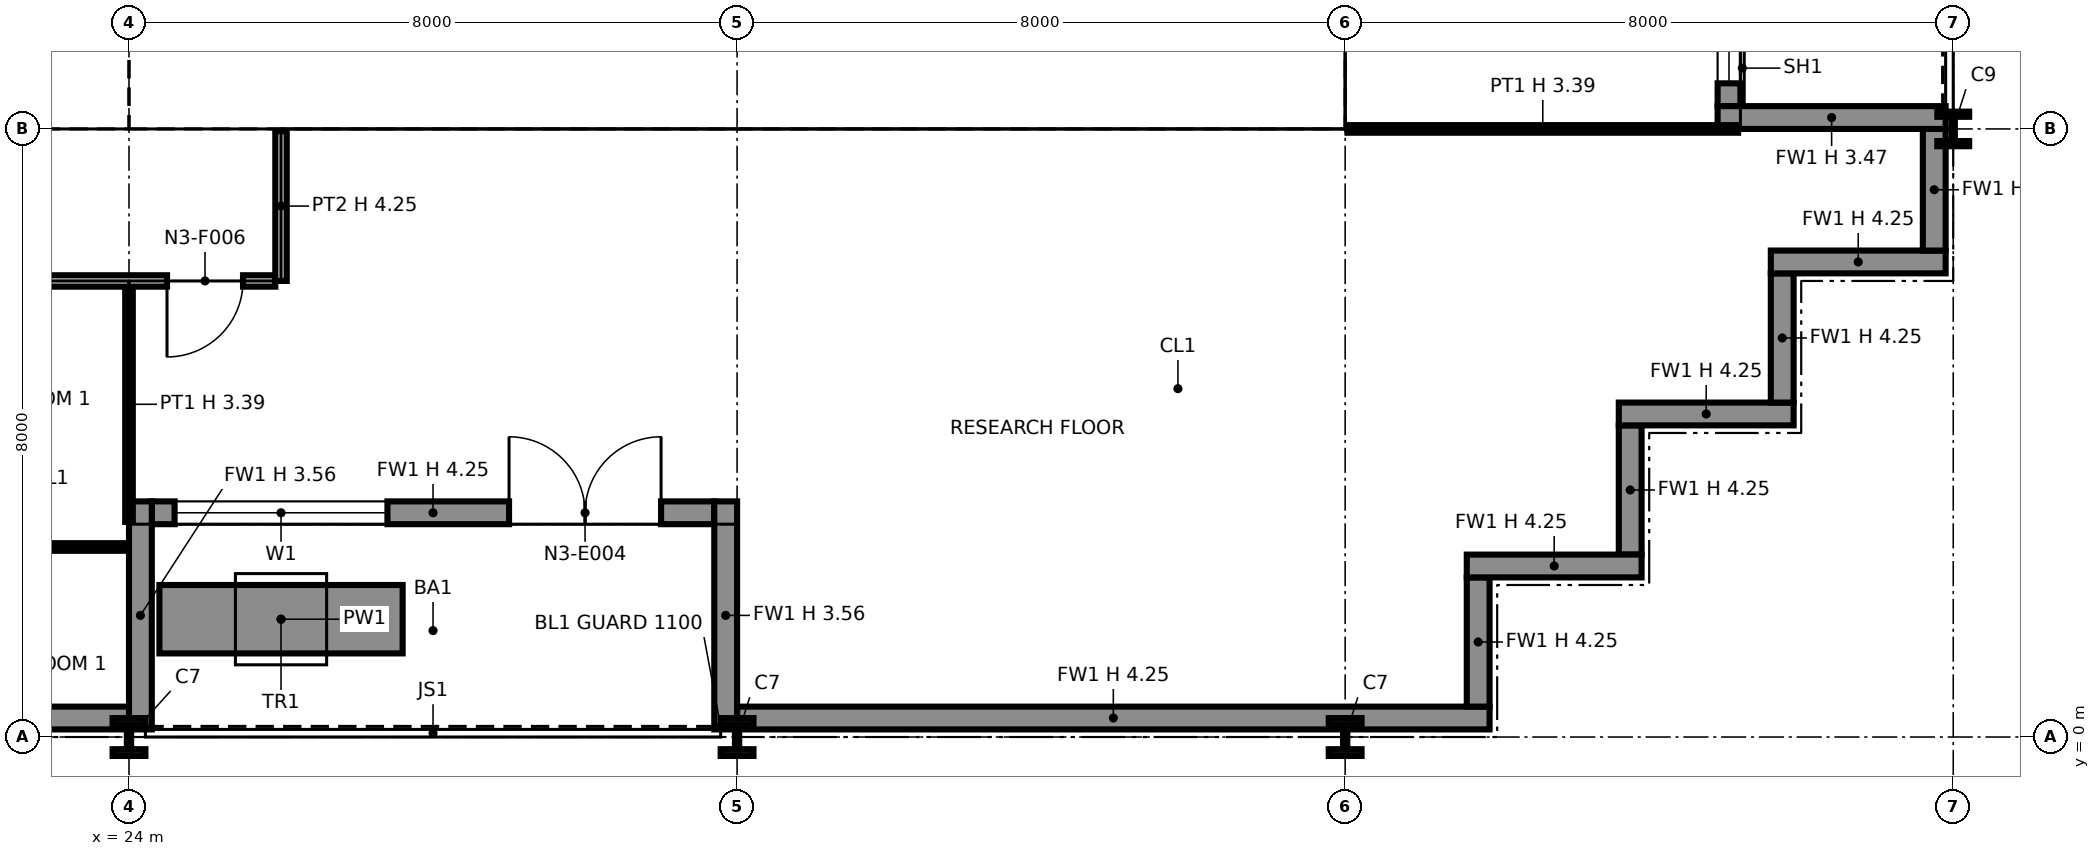
"""IFC4 building model, lengths in metres.
Left out: names, types, materials, properties, quantities, classifications, styles, units other than length and angle.
Written with IfcOpenShell. Run it as: python <this file> out.ifc"""

import sys

from ifc_helpers import new_model, si_unit, direction, frame, frame_2d, origin, origin_2d, place, context, subcontext, project, spatial, polyline, rectangle, i_section, outline, extrude, element, fill, save


model = new_model("IFC4")
c1 = context("Model", 3, precision=1e-05, world=origin(), true_north=direction((0.0, 1.0)))
c2 = subcontext(c1, "Body", "Model", "MODEL_VIEW")
j1 = project(units=[si_unit("LENGTHUNIT", "METRE"), si_unit("PLANEANGLEUNIT", "RADIAN")], contexts=[c1])
p1 = place(None, origin())
s1 = spatial("IfcSite", under=j1, at=p1, CompositionType="ELEMENT")
p2 = place(p1, origin())
s2 = spatial("IfcBuilding", under=s1, at=p2, CompositionType="ELEMENT")
p3 = place(p2, frame((0.0, 0.0, 61.2)))
s3 = spatial("IfcBuildingStorey", under=s2, at=p3, CompositionType="ELEMENT", Elevation=61.2)
p4 = place(p3, frame((24.0, 0.0, 0.0), z_axis=(0.0, 0.0, 1.0), x_axis=(1.0, 0.0, 0.0)))
e1 = element("IfcColumn", 1, at=p4, inside=s3, PredefinedType="COLUMN", context=c2, shape_type="SweptSolid", body=[
    extrude(i_section(OverallWidth=0.432, OverallDepth=0.498, WebThickness=0.056, FlangeThickness=0.089, at=origin_2d()), origin(), (0.0, 0.0, 1.0), 4.25),
])
p5 = place(p3, frame((24.0, 8.0, 0.0), z_axis=(0.0, 0.0, 1.0), x_axis=(1.0, 0.0, 0.0)))
e2 = element("IfcColumn", 2, at=p5, inside=s3, PredefinedType="COLUMN", context=c2, shape_type="SweptSolid", body=[
    extrude(i_section(OverallWidth=0.424, OverallDepth=0.475, WebThickness=0.048, FlangeThickness=0.077, at=origin_2d()), origin(), (0.0, 0.0, 1.0), 4.25),
])
p6 = place(p3, frame((32.0, 0.0, 0.0), z_axis=(0.0, 0.0, 1.0), x_axis=(1.0, 0.0, 0.0)))
e3 = element("IfcColumn", 3, at=p6, inside=s3, PredefinedType="COLUMN", context=c2, shape_type="SweptSolid", body=[
    extrude(i_section(OverallWidth=0.432, OverallDepth=0.498, WebThickness=0.056, FlangeThickness=0.089, at=origin_2d()), origin(), (0.0, 0.0, 1.0), 4.25),
])
p7 = place(p3, frame((32.0, 8.0, 0.0), z_axis=(0.0, 0.0, 1.0), x_axis=(1.0, 0.0, 0.0)))
e4 = element("IfcColumn", 4, at=p7, inside=s3, PredefinedType="COLUMN", context=c2, shape_type="SweptSolid", body=[
    extrude(i_section(OverallWidth=0.406, OverallDepth=0.417, WebThickness=0.03, FlangeThickness=0.048, at=origin_2d()), origin(), (0.0, 0.0, 1.0), 4.25),
])
p8 = place(p3, frame((40.0, 0.0, 0.0), z_axis=(0.0, 0.0, 1.0), x_axis=(1.0, 0.0, 0.0)))
e5 = element("IfcColumn", 5, at=p8, inside=s3, PredefinedType="COLUMN", context=c2, shape_type="SweptSolid", body=[
    extrude(i_section(OverallWidth=0.432, OverallDepth=0.498, WebThickness=0.056, FlangeThickness=0.089, at=origin_2d()), origin(), (0.0, 0.0, 1.0), 4.25),
])
p9 = place(p3, frame((40.0, 8.0, 0.0), z_axis=(0.0, 0.0, 1.0), x_axis=(1.0, 0.0, 0.0)))
e6 = element("IfcColumn", 6, at=p9, inside=s3, PredefinedType="COLUMN", context=c2, shape_type="SweptSolid", body=[
    extrude(i_section(OverallWidth=0.406, OverallDepth=0.417, WebThickness=0.03, FlangeThickness=0.048, at=origin_2d()), origin(), (0.0, 0.0, 1.0), 4.25),
])
p10 = place(p3, frame((48.0, 8.0, 0.0), z_axis=(0.0, 0.0, 1.0), x_axis=(1.0, 0.0, 0.0)))
e7 = element("IfcColumn", 7, at=p10, inside=s3, PredefinedType="COLUMN", context=c2, shape_type="SweptSolid", body=[
    extrude(i_section(OverallWidth=0.419, OverallDepth=0.455, WebThickness=0.042, FlangeThickness=0.068, at=origin_2d()), origin(), (0.0, 0.0, 1.0), 4.25),
])
p11 = place(p3, frame((16.0, 0.25, 0.0), z_axis=(0.0, 0.0, 1.0), x_axis=(1.0, 0.0, 0.0)))
e8 = element("IfcWall", 8, at=p11, inside=s3, PredefinedType="SOLIDWALL", context=c2, shape_type="SweptSolid", body=[
    extrude(rectangle(XDim=8.0, YDim=0.3, at=frame_2d((4.0, 0.0))), origin(), (0.0, 0.0, 1.0), 4.25),
])
p12 = place(p3, frame((24.3, 2.95, 0.0), z_axis=(0.0, 0.0, 1.0), x_axis=(1.0, 0.0, 0.0)))
e9 = element("IfcWall", 9, at=p12, inside=s3, PredefinedType="SOLIDWALL", context=c2, shape_type="SweptSolid", body=[
    extrude(rectangle(XDim=7.4, YDim=0.3, at=frame_2d((3.7, 0.0))), origin(), (0.0, 0.0, 1.0), 4.25),
])
p13 = place(p12, frame((0.3, 0.0, 0.9)))
e10 = element("IfcOpeningElement", 10, at=p13, cuts=e9, PredefinedType="OPENING", context=c2, shape_type="SweptSolid", body=[
    extrude(rectangle(XDim=2.8, YDim=2.2, at=frame_2d((1.4, 1.1))), frame((0.0, 0.16, 0.0), z_axis=(0.0, -1.0, 0.0), x_axis=(1.0, 0.0, 0.0)), (0.0, 0.0, 1.0), 0.32),
])
p14 = place(p12, frame((4.7, 0.0, 0.0)))
e11 = element("IfcOpeningElement", 11, at=p14, cuts=e9, PredefinedType="OPENING", context=c2, shape_type="SweptSolid", body=[
    extrude(rectangle(XDim=2.0, YDim=2.4, at=frame_2d((1.0, 1.2))), frame((0.0, 0.16, 0.0), z_axis=(0.0, -1.0, 0.0), x_axis=(1.0, 0.0, 0.0)), (0.0, 0.0, 1.0), 0.32),
])
for number, where, z_axis, x_axis in (
    (12, (24.15, 0.1, 0.0), (0.0, 0.0, 1.0), (0.0, 1.0, 0.0)),
    (13, (31.85, 0.1, 0.0), (0.0, 0.0, 1.0), (0.0, 1.0, 0.0)),
):
    element("IfcWall", number, at=place(p3, frame(where, z_axis=z_axis, x_axis=x_axis)), inside=s3, PredefinedType="SOLIDWALL", context=c2, shape_type="SweptSolid", body=[
        extrude(rectangle(XDim=3.0, YDim=0.3, at=frame_2d((1.5, 0.0))), origin(), (0.0, 0.0, 1.0), 3.556),
    ])
p15 = place(p3, frame((32.0, 0.25, 0.0), z_axis=(0.0, 0.0, 1.0), x_axis=(1.0, 0.0, 0.0)))
e14 = element("IfcWall", 14, at=p15, inside=s3, PredefinedType="SOLIDWALL", context=c2, shape_type="SweptSolid", body=[
    extrude(rectangle(XDim=9.9, YDim=0.3, at=frame_2d((4.95, 0.0))), origin(), (0.0, 0.0, 1.0), 4.25),
])
p16 = place(p3, frame((24.4, 1.55, 0.0), z_axis=(0.0, 0.0, 1.0), x_axis=(1.0, 0.0, 0.0)))
e15 = element("IfcWall", 15, at=p16, inside=s3, PredefinedType="SOLIDWALL", context=c2, shape_type="SweptSolid", body=[
    extrude(rectangle(XDim=3.2, YDim=0.9, at=frame_2d((1.6, 0.0))), origin(), (0.0, 0.0, 1.0), 0.6),
])
p17 = place(p3, frame((41.75, 0.4, 0.0), z_axis=(0.0, 0.0, 1.0), x_axis=(0.0, 1.0, 0.0)))
e16 = element("IfcWall", 16, at=p17, inside=s3, PredefinedType="SOLIDWALL", context=c2, shape_type="SweptSolid", body=[
    extrude(rectangle(XDim=1.7, YDim=0.3, at=frame_2d((0.85, 0.0))), origin(), (0.0, 0.0, 1.0), 4.25),
])
p18 = place(p3, frame((41.6, 2.25, 0.0), z_axis=(0.0, 0.0, 1.0), x_axis=(1.0, 0.0, 0.0)))
e17 = element("IfcWall", 17, at=p18, inside=s3, PredefinedType="SOLIDWALL", context=c2, shape_type="SweptSolid", body=[
    extrude(rectangle(XDim=2.3, YDim=0.3, at=frame_2d((1.15, 0.0))), origin(), (0.0, 0.0, 1.0), 4.25),
])
p19 = place(p3, frame((43.75, 2.4, 0.0), z_axis=(0.0, 0.0, 1.0), x_axis=(0.0, 1.0, 0.0)))
e18 = element("IfcWall", 18, at=p19, inside=s3, PredefinedType="SOLIDWALL", context=c2, shape_type="SweptSolid", body=[
    extrude(rectangle(XDim=1.7, YDim=0.3, at=frame_2d((0.85, 0.0))), origin(), (0.0, 0.0, 1.0), 4.25),
])
p20 = place(p3, frame((43.6, 4.25, 0.0), z_axis=(0.0, 0.0, 1.0), x_axis=(1.0, 0.0, 0.0)))
e19 = element("IfcWall", 19, at=p20, inside=s3, PredefinedType="SOLIDWALL", context=c2, shape_type="SweptSolid", body=[
    extrude(rectangle(XDim=2.3, YDim=0.3, at=frame_2d((1.15, 0.0))), origin(), (0.0, 0.0, 1.0), 4.25),
])
p21 = place(p3, frame((45.75, 4.4, 0.0), z_axis=(0.0, 0.0, 1.0), x_axis=(0.0, 1.0, 0.0)))
e20 = element("IfcWall", 20, at=p21, inside=s3, PredefinedType="SOLIDWALL", context=c2, shape_type="SweptSolid", body=[
    extrude(rectangle(XDim=1.7, YDim=0.3, at=frame_2d((0.85, 0.0))), origin(), (0.0, 0.0, 1.0), 4.25),
])
p22 = place(p3, frame((45.6, 6.25, 0.0), z_axis=(0.0, 0.0, 1.0), x_axis=(1.0, 0.0, 0.0)))
e21 = element("IfcWall", 21, at=p22, inside=s3, PredefinedType="SOLIDWALL", context=c2, shape_type="SweptSolid", body=[
    extrude(rectangle(XDim=2.3, YDim=0.3, at=frame_2d((1.15, 0.0))), origin(), (0.0, 0.0, 1.0), 4.25),
])
p23 = place(p3, frame((47.75, 6.4, 0.0), z_axis=(0.0, 0.0, 1.0), x_axis=(0.0, 1.0, 0.0)))
e22 = element("IfcWall", 22, at=p23, inside=s3, PredefinedType="SOLIDWALL", context=c2, shape_type="SweptSolid", body=[
    extrude(rectangle(XDim=1.6, YDim=0.3, at=frame_2d((0.8, 0.0))), origin(), (0.0, 0.0, 1.0), 4.25),
])
p24 = place(p3, frame((45.05, 8.3, 0.0), z_axis=(0.0, 0.0, 1.0), x_axis=(0.0, 1.0, 0.0)))
e23 = element("IfcWall", 23, at=p24, inside=s3, PredefinedType="SOLIDWALL", context=c2, shape_type="SweptSolid", body=[
    extrude(rectangle(XDim=7.4, YDim=0.3, at=frame_2d((3.7, 0.0))), origin(), (0.0, 0.0, 1.0), 4.25),
])
p25 = place(p24, frame((0.3, 0.0, 0.9)))
e24 = element("IfcOpeningElement", 24, at=p25, cuts=e23, PredefinedType="OPENING", context=c2, shape_type="SweptSolid", body=[
    extrude(rectangle(XDim=2.8, YDim=2.2, at=frame_2d((1.4, 1.1))), frame((0.0, 0.16, 0.0), z_axis=(0.0, -1.0, 0.0), x_axis=(1.0, 0.0, 0.0)), (0.0, 0.0, 1.0), 0.32),
])
p26 = place(p24, frame((4.7, 0.0, 0.0)))
e25 = element("IfcOpeningElement", 25, at=p26, cuts=e23, PredefinedType="OPENING", context=c2, shape_type="SweptSolid", body=[
    extrude(rectangle(XDim=2.0, YDim=2.4, at=frame_2d((1.0, 1.2))), frame((0.0, 0.16, 0.0), z_axis=(0.0, -1.0, 0.0), x_axis=(1.0, 0.0, 0.0)), (0.0, 0.0, 1.0), 0.32),
])
p27 = place(p3, frame((47.9, 8.15, 0.0), z_axis=(0.0, 0.0, 1.0), x_axis=(-1.0, 0.0, 0.0)))
e26 = element("IfcWall", 26, at=p27, inside=s3, PredefinedType="SOLIDWALL", context=c2, shape_type="SweptSolid", body=[
    extrude(rectangle(XDim=3.0, YDim=0.3, at=frame_2d((1.5, 0.0))), origin(), (0.0, 0.0, 1.0), 3.469),
])
p28 = place(p3, frame((8.65, 8.75, 0.0), z_axis=(0.0, 0.0, 1.0), x_axis=(1.0, 0.0, 0.0)))
e27 = element("IfcWall", 27, at=p28, inside=s3, PredefinedType="PARTITIONING", context=c2, shape_type="SweptSolid", body=[
    extrude(outline(polyline([(0.0, 0.0), (14.7, 0.0), (14.7, 4.25), (7.469, 4.25), (7.469, 3.632), (7.231, 3.632), (7.23, 4.25), (0.0, 4.25), (0.0, 0.0)])), frame((0.0, 0.1, 0.0), z_axis=(0.0, -1.0, 0.0), x_axis=(1.0, 0.0, 0.0)), (0.0, 0.0, 1.0), 0.2),
])
p29 = place(p28, frame((1.3, 0.0, 0.0)))
e28 = element("IfcOpeningElement", 28, at=p29, cuts=e27, PredefinedType="OPENING", context=c2, shape_type="SweptSolid", body=[
    extrude(rectangle(XDim=1.4, YDim=2.1, at=frame_2d((0.7, 1.05))), frame((0.0, 0.11, 0.0), z_axis=(0.0, -1.0, 0.0), x_axis=(1.0, 0.0, 0.0)), (0.0, 0.0, 1.0), 0.22),
])
p30 = place(p28, frame((4.6, 0.0, 0.0)))
e29 = element("IfcOpeningElement", 29, at=p30, cuts=e27, PredefinedType="OPENING", context=c2, shape_type="SweptSolid", body=[
    extrude(rectangle(XDim=1.4, YDim=2.1, at=frame_2d((0.7, 1.05))), frame((0.0, 0.11, 0.0), z_axis=(0.0, -1.0, 0.0), x_axis=(1.0, 0.0, 0.0)), (0.0, 0.0, 1.0), 0.22),
])
p31 = place(p28, frame((10.4, 0.0, 0.0)))
e30 = element("IfcOpeningElement", 30, at=p31, cuts=e27, PredefinedType="OPENING", context=c2, shape_type="SweptSolid", body=[
    extrude(rectangle(XDim=1.2, YDim=2.1, at=frame_2d((0.6, 1.05))), frame((0.0, 0.11, 0.0), z_axis=(0.0, -1.0, 0.0), x_axis=(1.0, 0.0, 0.0)), (0.0, 0.0, 1.0), 0.22),
])
p32 = place(p3, frame((23.25, 8.85, 0.0), z_axis=(0.0, 0.0, 1.0), x_axis=(0.0, 1.0, 0.0)))
e31 = element("IfcWall", 31, at=p32, inside=s3, PredefinedType="PARTITIONING", context=c2, shape_type="SweptSolid", body=[
    extrude(outline(polyline([(0.0, 0.0), (14.3, 0.0), (14.3, 4.25), (11.231, 4.25), (11.23, 3.789), (11.07, 3.789), (11.069, 4.25), (7.27, 4.25), (7.269, 3.632), (7.031, 3.632), (7.031, 4.25), (1.231, 4.25), (1.23, 3.789), (1.07, 3.789), (1.069, 4.25), (0.0, 4.25), (0.0, 0.0)])), frame((0.0, 0.1, 0.0), z_axis=(0.0, -1.0, 0.0), x_axis=(1.0, 0.0, 0.0)), (0.0, 0.0, 1.0), 0.2),
])
p33 = place(p32, frame((8.3, 0.0, 0.0)))
e32 = element("IfcOpeningElement", 32, at=p33, cuts=e31, PredefinedType="OPENING", context=c2, shape_type="SweptSolid", body=[
    extrude(rectangle(XDim=1.8, YDim=2.1, at=frame_2d((0.9, 1.05))), frame((0.0, 0.11, 0.0), z_axis=(0.0, -1.0, 0.0), x_axis=(1.0, 0.0, 0.0)), (0.0, 0.0, 1.0), 0.22),
])
p34 = place(p3, frame((24.65, 8.75, 0.0), z_axis=(0.0, 0.0, 1.0), x_axis=(1.0, 0.0, 0.0)))
e33 = element("IfcWall", 33, at=p34, inside=s3, PredefinedType="PARTITIONING", context=c2, shape_type="SweptSolid", body=[
    extrude(outline(polyline([(0.0, 0.0), (14.7, 0.0), (14.7, 4.25), (7.469, 4.25), (7.469, 3.632), (7.231, 3.632), (7.23, 4.25), (0.0, 4.25), (0.0, 0.0)])), frame((0.0, 0.1, 0.0), z_axis=(0.0, -1.0, 0.0), x_axis=(1.0, 0.0, 0.0)), (0.0, 0.0, 1.0), 0.2),
])
p35 = place(p3, frame((24.75, 8.85, 0.0), z_axis=(0.0, 0.0, 1.0), x_axis=(0.0, 1.0, 0.0)))
e34 = element("IfcWall", 34, at=p35, inside=s3, PredefinedType="PARTITIONING", context=c2, shape_type="SweptSolid", body=[
    extrude(outline(polyline([(0.0, 0.0), (6.3, 0.0), (6.3, 4.25), (3.231, 4.25), (3.23, 3.789), (3.07, 3.789), (3.069, 4.25), (0.0, 4.25), (0.0, 0.0)])), frame((0.0, 0.1, 0.0), z_axis=(0.0, -1.0, 0.0), x_axis=(1.0, 0.0, 0.0)), (0.0, 0.0, 1.0), 0.2),
])
for number, where, z_axis, x_axis in (
    (35, (27.875, 8.85, 0.0), (0.0, 0.0, 1.0), (0.0, 1.0, 0.0)),
    (36, (29.925, 8.85, 0.0), (0.0, 0.0, 1.0), (0.0, 1.0, 0.0)),
):
    element("IfcWall", number, at=place(p3, frame(where, z_axis=z_axis, x_axis=x_axis)), inside=s3, PredefinedType="PARTITIONING", context=c2, shape_type="SweptSolid", body=[
        extrude(outline(polyline([(0.0, 0.0), (4.2, 0.0), (4.2, 4.25), (3.231, 4.25), (3.23, 3.789), (3.07, 3.789), (3.069, 4.25), (0.0, 4.25), (0.0, 0.0)])), frame((0.0, 0.075, 0.0), z_axis=(0.0, -1.0, 0.0), x_axis=(1.0, 0.0, 0.0)), (0.0, 0.0, 1.0), 0.15),
    ])
p36 = place(p3, frame((32.0, 8.85, 0.0), z_axis=(0.0, 0.0, 1.0), x_axis=(0.0, 1.0, 0.0)))
e37 = element("IfcWall", 37, at=p36, inside=s3, PredefinedType="PARTITIONING", context=c2, shape_type="SweptSolid", body=[
    extrude(rectangle(XDim=4.2, YDim=0.6, at=frame_2d((2.1, 0.0))), origin(), (0.0, 0.0, 1.0), 3.632),
])
for number, where, z_axis, x_axis in (
    (38, (35.6, 8.85, 0.0), (0.0, 0.0, 1.0), (0.0, 1.0, 0.0)),
    (39, (39.25, 8.85, 0.0), (0.0, 0.0, 1.0), (0.0, 1.0, 0.0)),
):
    element("IfcWall", number, at=place(p3, frame(where, z_axis=z_axis, x_axis=x_axis)), inside=s3, PredefinedType="PARTITIONING", context=c2, shape_type="SweptSolid", body=[
        extrude(rectangle(XDim=6.3, YDim=0.2, at=frame_2d((3.15, 0.0))), origin(), (0.0, 0.0, 1.0), 4.25),
    ])
p37 = place(p3, frame((20.05, 2.5, 0.0), z_axis=(0.0, 0.0, 1.0), x_axis=(1.0, 0.0, 0.0)))
e40 = element("IfcWall", 40, at=p37, inside=s3, PredefinedType="PARTITIONING", context=c2, shape_type="SweptSolid", body=[
    extrude(rectangle(XDim=3.92, YDim=0.1, at=frame_2d((1.96, 0.0))), origin(), (0.0, 0.0, 1.0), 4.25),
])
p38 = place(p37, frame((1.45, 0.0, 0.0)))
e41 = element("IfcOpeningElement", 41, at=p38, cuts=e40, PredefinedType="OPENING", context=c2, shape_type="SweptSolid", body=[
    extrude(rectangle(XDim=1.0, YDim=2.1, at=frame_2d((0.5, 1.05))), frame((0.0, 0.06, 0.0), z_axis=(0.0, -1.0, 0.0), x_axis=(1.0, 0.0, 0.0)), (0.0, 0.0, 1.0), 0.12),
])
p39 = place(p3, frame((24.0, 2.83, 0.0), z_axis=(0.0, 0.0, 1.0), x_axis=(0.0, 1.0, 0.0)))
e42 = element("IfcWall", 42, at=p39, inside=s3, PredefinedType="PARTITIONING", context=c2, shape_type="SweptSolid", body=[
    extrude(rectangle(XDim=3.095, YDim=0.1, at=frame_2d((1.547, 0.0))), origin(), (0.0, 0.0, 1.0), 3.391),
])
p40 = place(p3, frame((6.075, 6.0, 0.0), z_axis=(0.0, 0.0, 1.0), x_axis=(1.0, 0.0, 0.0)))
e43 = element("IfcWall", 43, at=p40, inside=s3, PredefinedType="PARTITIONING", context=c2, shape_type="SweptSolid", body=[
    extrude(rectangle(XDim=19.85, YDim=0.15, at=frame_2d((9.925, 0.0))), origin(), (0.0, 0.0, 1.0), 4.25),
])
p41 = place(p40, frame((12.425, 0.0, 0.0), z_axis=(0.0, 0.0, 1.0), x_axis=(-1.0, 0.0, 0.0)))
e44 = element("IfcOpeningElement", 44, at=p41, cuts=e43, PredefinedType="OPENING", context=c2, shape_type="SweptSolid", body=[
    extrude(rectangle(XDim=1.0, YDim=2.1, at=frame_2d((0.5, 1.05))), frame((0.0, 0.085, 0.0), z_axis=(0.0, -1.0, 0.0), x_axis=(1.0, 0.0, 0.0)), (0.0, 0.0, 1.0), 0.17),
])
p42 = place(p40, frame((16.425, 0.0, 0.0), z_axis=(0.0, 0.0, 1.0), x_axis=(-1.0, 0.0, 0.0)))
e45 = element("IfcOpeningElement", 45, at=p42, cuts=e43, PredefinedType="OPENING", context=c2, shape_type="SweptSolid", body=[
    extrude(rectangle(XDim=1.0, YDim=2.1, at=frame_2d((0.5, 1.05))), frame((0.0, 0.085, 0.0), z_axis=(0.0, -1.0, 0.0), x_axis=(1.0, 0.0, 0.0)), (0.0, 0.0, 1.0), 0.17),
])
p43 = place(p40, frame((4.425, 0.0, 0.0), z_axis=(0.0, 0.0, 1.0), x_axis=(-1.0, 0.0, 0.0)))
e46 = element("IfcOpeningElement", 46, at=p43, cuts=e43, PredefinedType="OPENING", context=c2, shape_type="SweptSolid", body=[
    extrude(rectangle(XDim=1.0, YDim=2.1, at=frame_2d((0.5, 1.05))), frame((0.0, 0.085, 0.0), z_axis=(0.0, -1.0, 0.0), x_axis=(1.0, 0.0, 0.0)), (0.0, 0.0, 1.0), 0.17),
])
p44 = place(p40, frame((8.425, 0.0, 0.0), z_axis=(0.0, 0.0, 1.0), x_axis=(-1.0, 0.0, 0.0)))
e47 = element("IfcOpeningElement", 47, at=p44, cuts=e43, PredefinedType="OPENING", context=c2, shape_type="SweptSolid", body=[
    extrude(rectangle(XDim=1.0, YDim=2.1, at=frame_2d((0.5, 1.05))), frame((0.0, 0.085, 0.0), z_axis=(0.0, -1.0, 0.0), x_axis=(1.0, 0.0, 0.0)), (0.0, 0.0, 1.0), 0.17),
])
p45 = place(p40, frame((19.425, 0.0, 0.0), z_axis=(0.0, 0.0, 1.0), x_axis=(-1.0, 0.0, 0.0)))
e48 = element("IfcOpeningElement", 48, at=p45, cuts=e43, PredefinedType="OPENING", context=c2, shape_type="SweptSolid", body=[
    extrude(rectangle(XDim=1.0, YDim=2.1, at=frame_2d((0.5, 1.05))), frame((0.0, 0.085, 0.0), z_axis=(0.0, -1.0, 0.0), x_axis=(1.0, 0.0, 0.0)), (0.0, 0.0, 1.0), 0.17),
])
p46 = place(p3, frame((26.0, 6.0, 0.0), z_axis=(0.0, 0.0, 1.0), x_axis=(0.0, 1.0, 0.0)))
e49 = element("IfcWall", 49, at=p46, inside=s3, PredefinedType="PARTITIONING", context=c2, shape_type="SweptSolid", body=[
    extrude(rectangle(XDim=1.97, YDim=0.15, at=frame_2d((0.985, 0.0))), origin(), (0.0, 0.0, 1.0), 4.25),
])
p47 = place(p3, frame((40.03, 8.0, 0.0), z_axis=(0.0, 0.0, 1.0), x_axis=(1.0, 0.0, 0.0)))
e50 = element("IfcWall", 50, at=p47, inside=s3, PredefinedType="PARTITIONING", context=c2, shape_type="SweptSolid", body=[
    extrude(rectangle(XDim=5.14, YDim=0.1, at=frame_2d((2.57, 0.0))), origin(), (0.0, 0.0, 1.0), 3.391),
])
p48 = place(p13, origin())
e51 = element("IfcWindow", 51, at=p48, inside=s3, PartitioningType="SINGLE_PANEL", PredefinedType="WINDOW", context=c2, shape_type="SweptSolid", body=[
    extrude(rectangle(XDim=2.8, YDim=2.2, at=frame_2d((1.4, 1.1))), frame((0.0, 0.03, 0.0), z_axis=(0.0, -1.0, 0.0), x_axis=(1.0, 0.0, 0.0)), (0.0, 0.0, 1.0), 0.06),
])
fill(e10, e51)
p49 = place(p14, origin())
e52 = element("IfcDoor", 52, at=p49, inside=s3, OperationType="DOUBLE_DOOR_SINGLE_SWING", PredefinedType="DOOR", context=c2, shape_type="SweptSolid", body=[
    extrude(rectangle(XDim=2.0, YDim=2.4, at=frame_2d((1.0, 1.2))), frame((0.0, 0.025, 0.0), z_axis=(0.0, -1.0, 0.0), x_axis=(1.0, 0.0, 0.0)), (0.0, 0.0, 1.0), 0.05),
])
fill(e11, e52)
p50 = place(p25, origin())
e53 = element("IfcWindow", 53, at=p50, inside=s3, PartitioningType="SINGLE_PANEL", PredefinedType="WINDOW", context=c2, shape_type="SweptSolid", body=[
    extrude(rectangle(XDim=2.8, YDim=2.2, at=frame_2d((1.4, 1.1))), frame((0.0, 0.03, 0.0), z_axis=(0.0, -1.0, 0.0), x_axis=(1.0, 0.0, 0.0)), (0.0, 0.0, 1.0), 0.06),
])
fill(e24, e53)
p51 = place(p45, origin())
e54 = element("IfcDoor", 54, at=p51, inside=s3, OperationType="SINGLE_SWING_RIGHT", PredefinedType="DOOR", context=c2, shape_type="SweptSolid", body=[
    extrude(rectangle(XDim=1.0, YDim=2.1, at=frame_2d((0.5, 1.05))), frame((0.0, 0.025, 0.0), z_axis=(0.0, -1.0, 0.0), x_axis=(1.0, 0.0, 0.0)), (0.0, 0.0, 1.0), 0.05),
])
fill(e48, e54)
save(model, sys.argv[1])
